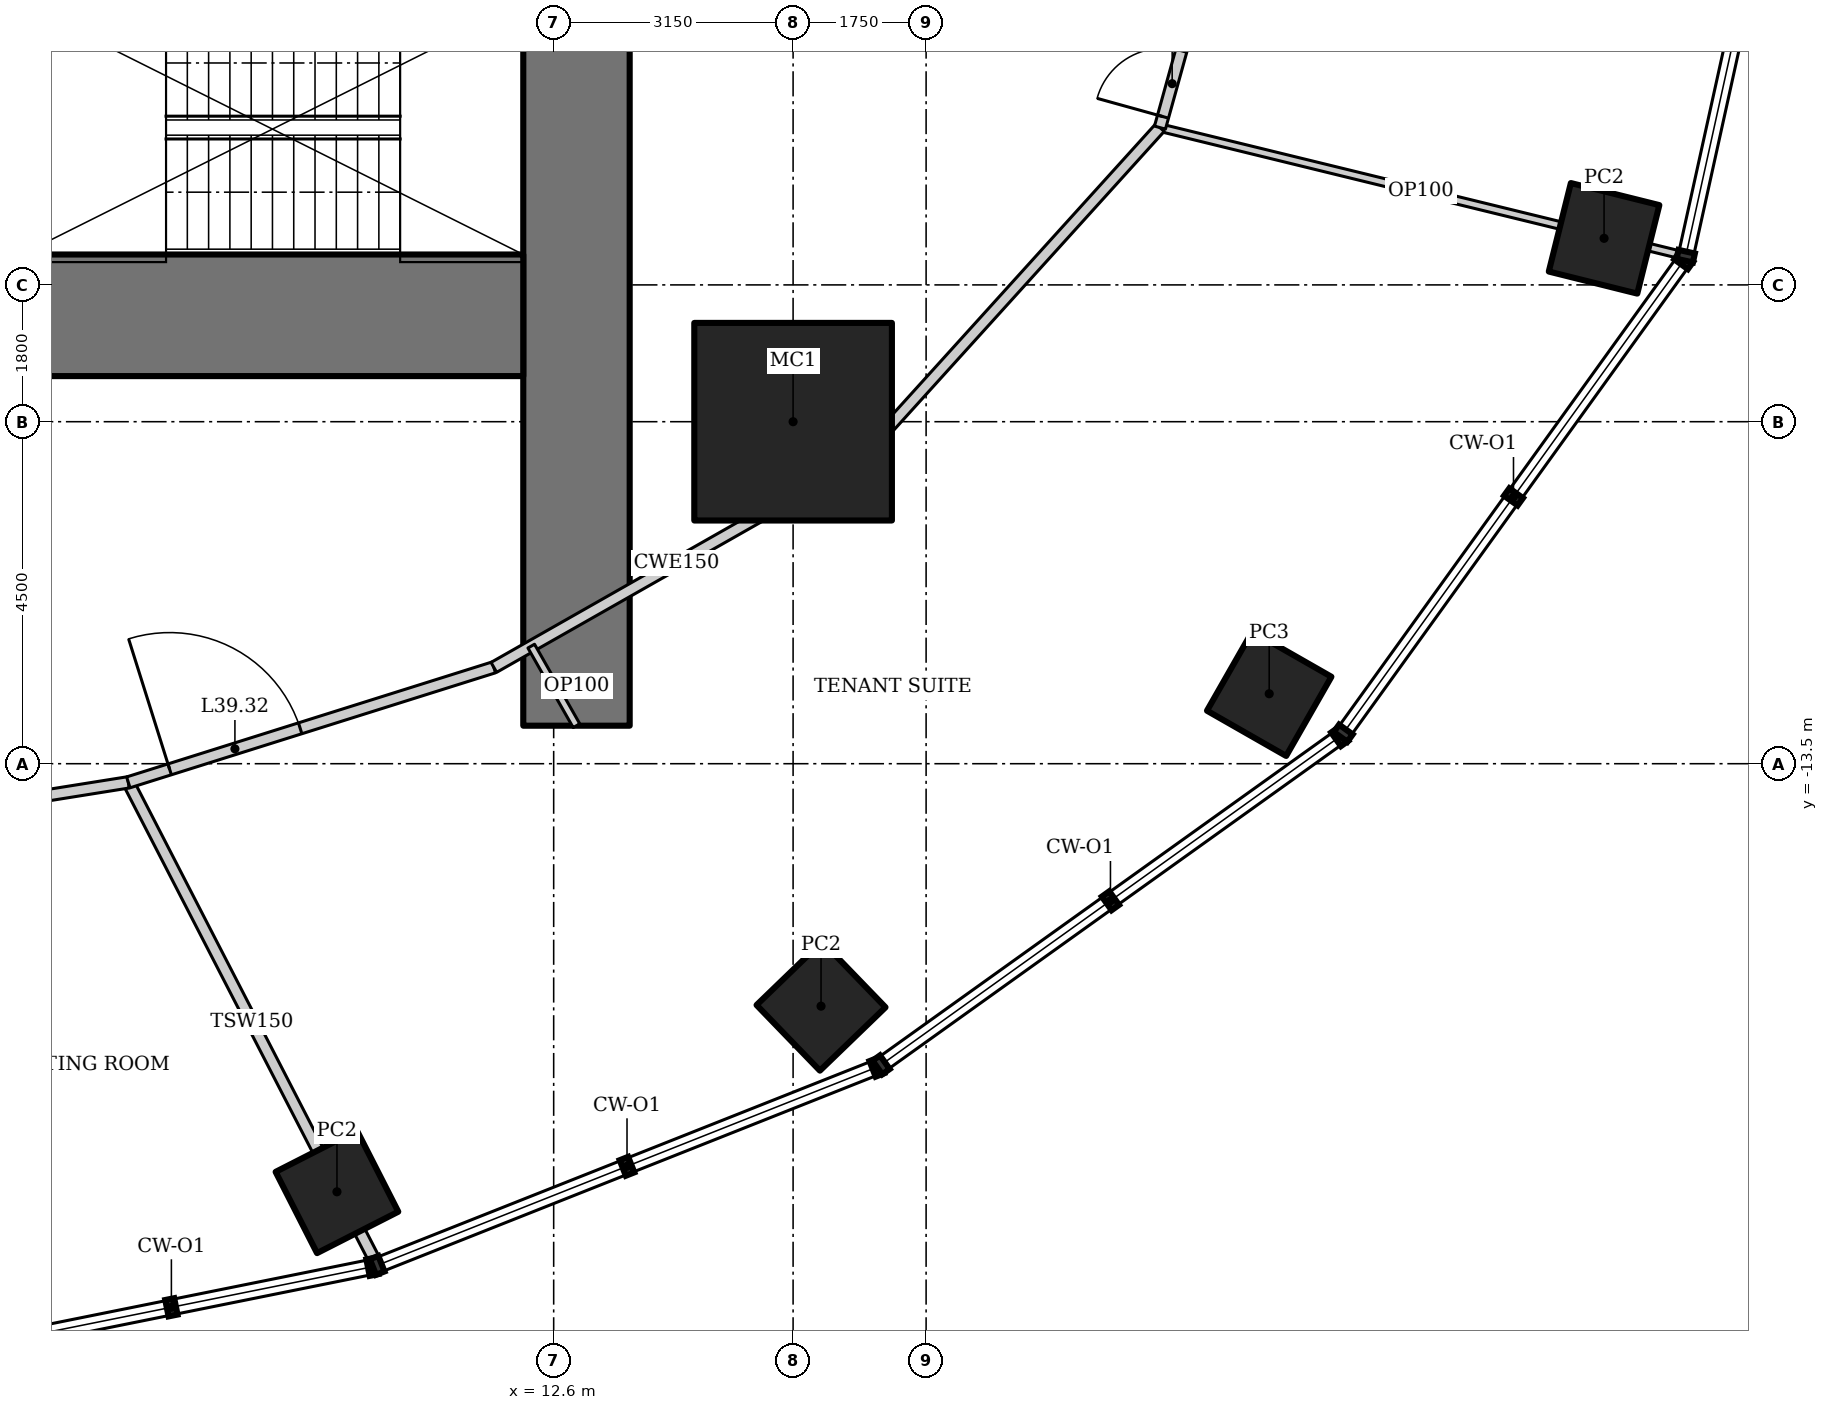
"""IFC4 building model, lengths in metres.
Left out: names, types, materials, properties, quantities, classifications, styles, units other than length and angle.
Written with IfcOpenShell. Run it as: python <this file> out.ifc"""

import sys

from ifc_helpers import new_model, si_unit, direction, frame, frame_2d, origin, origin_2d, place, context, subcontext, project, spatial, rectangle, hollow_rectangle, extrude, element, fill, save


model = new_model("IFC4")
c1 = context("Model", 3, precision=1e-05, world=origin(), true_north=direction((0.0, 1.0)))
c2 = subcontext(c1, "Body", "Model", "MODEL_VIEW")
j1 = project(units=[si_unit("LENGTHUNIT", "METRE"), si_unit("PLANEANGLEUNIT", "RADIAN")], contexts=[c1])
p1 = place(None, origin())
s1 = spatial("IfcSite", under=j1, at=p1, CompositionType="ELEMENT")
p2 = place(p1, origin())
s2 = spatial("IfcBuilding", under=s1, at=p2, CompositionType="ELEMENT")
p3 = place(p2, frame((0.0, 0.0, 167.8)))
s3 = spatial("IfcBuildingStorey", under=s2, at=p3, CompositionType="ELEMENT", Elevation=167.8)
p4 = place(p3, frame((15.75, -9.0, 0.0), z_axis=(0.0, 0.0, 1.0), x_axis=(1.0, 0.0, 0.0)))
e1 = element("IfcColumn", 1, at=p4, inside=s3, PredefinedType="COLUMN", context=c2, shape_type="SweptSolid", body=[
    extrude(hollow_rectangle(XDim=2.6, YDim=2.6, WallThickness=0.13, at=origin_2d()), origin(), (0.0, 0.0, 1.0), 4.2),
])
for number, where, z_axis, x_axis in (
    (2, (9.749, -19.133, 0.0), (0.0, 0.0, 1.0), (0.891, 0.454, 0.0)),
    (3, (16.118, -16.69, 0.0), (0.0, 0.0, 1.0), (0.719, 0.695, 0.0)),
):
    element("IfcColumn", number, at=place(p3, frame(where, z_axis=z_axis, x_axis=x_axis)), inside=s3, PredefinedType="COLUMN", context=c2, shape_type="SweptSolid", body=[
        extrude(hollow_rectangle(XDim=1.2, YDim=1.2, WallThickness=0.1, at=origin_2d()), origin(), (0.0, 0.0, 1.0), 4.2),
    ])
p5 = place(p3, frame((22.014, -12.579, 0.0), z_axis=(0.0, 0.0, 1.0), x_axis=(0.496139221777, 0.86824298017, 0.0)))
e4 = element("IfcColumn", 4, at=p5, inside=s3, PredefinedType="COLUMN", context=c2, shape_type="SweptSolid", body=[
    extrude(hollow_rectangle(XDim=1.2, YDim=1.2, WallThickness=0.12, at=origin_2d()), origin(), (0.0, 0.0, 1.0), 4.2),
])
p6 = place(p3, frame((26.42, -6.587, 0.0), z_axis=(0.0, 0.0, 1.0), x_axis=(0.2419218956, 0.970295726276, 0.0)))
e5 = element("IfcColumn", 5, at=p6, inside=s3, PredefinedType="COLUMN", context=c2, shape_type="SweptSolid", body=[
    extrude(hollow_rectangle(XDim=1.2, YDim=1.2, WallThickness=0.1, at=origin_2d()), origin(), (0.0, 0.0, 1.0), 4.2),
])
p7 = place(p3, frame((12.9, -13.0, 0.0), z_axis=(0.0, 0.0, 1.0), x_axis=(0.0, 1.0, 0.0)))
e6 = element("IfcWall", 6, at=p7, inside=s3, PredefinedType="SHEAR", context=c2, shape_type="SweptSolid", body=[
    extrude(rectangle(XDim=26.0, YDim=1.4, at=frame_2d((13.0, 0.0))), origin(), (0.0, 0.0, 1.0), 4.2),
])
p8 = place(p7, frame((12.1, 0.0, 0.0)))
e7 = element("IfcOpeningElement", 7, at=p8, cuts=e6, PredefinedType="OPENING", context=c2, shape_type="SweptSolid", body=[
    extrude(rectangle(XDim=1.8, YDim=2.1, at=frame_2d((0.9, 1.05))), frame((0.0, 0.71, 0.0), z_axis=(0.0, -1.0, 0.0), x_axis=(1.0, 0.0, 0.0)), (0.0, 0.0, 1.0), 1.42),
])
p9 = place(p3, frame((-12.2, -7.6, 0.0), z_axis=(0.0, 0.0, 1.0), x_axis=(1.0, 0.0, 0.0)))
e8 = element("IfcWall", 8, at=p9, inside=s3, PredefinedType="SHEAR", context=c2, shape_type="SweptSolid", body=[
    extrude(rectangle(XDim=24.4, YDim=1.6, at=frame_2d((12.2, 0.0))), origin(), (0.0, 0.0, 1.0), 4.2),
])
p10 = place(p3, frame((10.253, -20.052, 0.0), z_axis=(0.0, 0.0, 1.0), x_axis=(-0.458082677592, 0.888909590729, 0.0)))
e9 = element("IfcWall", 9, at=p10, inside=s3, PredefinedType="PARTITIONING", context=c2, shape_type="SweptSolid", body=[
    extrude(rectangle(XDim=7.094, YDim=0.15, at=frame_2d((3.547, 0.0))), origin(), (0.0, 0.0, 1.0), 3.349),
])
p11 = place(p3, frame((27.441, -6.809, 0.0), z_axis=(0.0, 0.0, 1.0), x_axis=(-0.971377572955, 0.237540755996, 0.0)))
e10 = element("IfcWall", 10, at=p11, inside=s3, PredefinedType="PARTITIONING", context=c2, shape_type="SweptSolid", body=[
    extrude(rectangle(XDim=7.066, YDim=0.1, at=frame_2d((3.533, 0.0))), origin(), (0.0, 0.0, 1.0), 3.113),
])
p12 = place(p3, frame((3.31, -14.335, 0.0), z_axis=(0.0, 0.0, 1.0), x_axis=(0.987511396594, 0.157547585181, 0.0)))
e11 = element("IfcWall", 11, at=p12, inside=s3, PredefinedType="PARTITIONING", context=c2, shape_type="SweptSolid", body=[
    extrude(rectangle(XDim=3.741, YDim=0.15, at=frame_2d((1.87, 0.0))), origin(), (0.0, 0.0, 1.0), 4.05),
])
p13 = place(p12, frame((0.15, 0.0, 0.0)))
e12 = element("IfcOpeningElement", 12, at=p13, cuts=e11, PredefinedType="OPENING", context=c2, shape_type="SweptSolid", body=[
    extrude(rectangle(XDim=0.9, YDim=2.1, at=frame_2d((0.45, 1.05))), frame((0.0, 0.085, 0.0), z_axis=(0.0, -1.0, 0.0), x_axis=(1.0, 0.0, 0.0)), (0.0, 0.0, 1.0), 0.17),
])
p14 = place(p3, frame((7.004, -13.746, 0.0), z_axis=(0.0, 0.0, 1.0), x_axis=(0.953893934057, 0.300143903101, 0.0)))
e13 = element("IfcWall", 13, at=p14, inside=s3, PredefinedType="PARTITIONING", context=c2, shape_type="SweptSolid", body=[
    extrude(rectangle(XDim=5.042, YDim=0.15, at=frame_2d((2.521, 0.0))), origin(), (0.0, 0.0, 1.0), 4.05),
])
p15 = place(p14, frame((0.57, 0.0, 0.0)))
e14 = element("IfcOpeningElement", 14, at=p15, cuts=e13, PredefinedType="OPENING", context=c2, shape_type="SweptSolid", body=[
    extrude(rectangle(XDim=1.8, YDim=2.1, at=frame_2d((0.9, 1.05))), frame((0.0, 0.085, 0.0), z_axis=(0.0, -1.0, 0.0), x_axis=(1.0, 0.0, 0.0)), (0.0, 0.0, 1.0), 0.17),
])
p16 = place(p3, frame((11.813, -12.232, 0.0), z_axis=(0.0, 0.0, 1.0), x_axis=(0.869375991036, 0.494151177485, 0.0)))
e15 = element("IfcWall", 15, at=p16, inside=s3, PredefinedType="PARTITIONING", context=c2, shape_type="SweptSolid", body=[
    extrude(rectangle(XDim=5.532, YDim=0.15, at=frame_2d((2.766, 0.0))), origin(), (0.0, 0.0, 1.0), 4.05),
])
p17 = place(p3, frame((16.623, -9.499, 0.0), z_axis=(0.0, 0.0, 1.0), x_axis=(0.671118353743, 0.741350224435, 0.0)))
e16 = element("IfcWall", 16, at=p17, inside=s3, PredefinedType="PARTITIONING", context=c2, shape_type="SweptSolid", body=[
    extrude(rectangle(XDim=5.892, YDim=0.15, at=frame_2d((2.946, 0.0))), origin(), (0.0, 0.0, 1.0), 4.05),
])
p18 = place(p3, frame((20.577, -5.13, 0.0), z_axis=(0.0, 0.0, 1.0), x_axis=(0.267293817428, 0.963615076244, 0.0)))
e17 = element("IfcWall", 17, at=p18, inside=s3, PredefinedType="PARTITIONING", context=c2, shape_type="SweptSolid", body=[
    extrude(rectangle(XDim=5.324, YDim=0.15, at=frame_2d((2.662, 0.0))), origin(), (0.0, 0.0, 1.0), 4.05),
])
p19 = place(p18, frame((0.15, 0.0, 0.0)))
e18 = element("IfcOpeningElement", 18, at=p19, cuts=e17, PredefinedType="OPENING", context=c2, shape_type="SweptSolid", body=[
    extrude(rectangle(XDim=0.9, YDim=2.1, at=frame_2d((0.45, 1.05))), frame((0.0, 0.085, 0.0), z_axis=(0.0, -1.0, 0.0), x_axis=(1.0, 0.0, 0.0)), (0.0, 0.0, 1.0), 0.17),
])
p20 = place(p3, frame((12.9, -13.0, 0.0), z_axis=(0.0, 0.0, 1.0), x_axis=(-0.494173075358, 0.869363543974, 0.0)))
e19 = element("IfcWall", 19, at=p20, inside=s3, PredefinedType="PARTITIONING", context=c2, shape_type="SweptSolid", body=[
    extrude(rectangle(XDim=1.204, YDim=0.1, at=frame_2d((0.602, 0.0))), origin(), (0.0, 0.0, 1.0), 4.05),
])
p21 = place(p15, origin())
e20 = element("IfcDoor", 20, at=p21, inside=s3, OperationType="DOUBLE_DOOR_DOUBLE_SWING", PredefinedType="DOOR", context=c2, shape_type="SweptSolid", body=[
    extrude(rectangle(XDim=1.8, YDim=2.1, at=frame_2d((0.9, 1.05))), frame((0.0, 0.025, 0.0), z_axis=(0.0, -1.0, 0.0), x_axis=(1.0, 0.0, 0.0)), (0.0, 0.0, 1.0), 0.05),
])
fill(e14, e20)
p22 = place(p19, origin())
e21 = element("IfcDoor", 21, at=p22, inside=s3, OperationType="SINGLE_SWING_LEFT", PredefinedType="DOOR", context=c2, shape_type="SweptSolid", body=[
    extrude(rectangle(XDim=0.9, YDim=2.1, at=frame_2d((0.45, 1.05))), frame((0.0, 0.025, 0.0), z_axis=(0.0, -1.0, 0.0), x_axis=(1.0, 0.0, 0.0)), (0.0, 0.0, 1.0), 0.05),
])
fill(e18, e21)
save(model, sys.argv[1])
